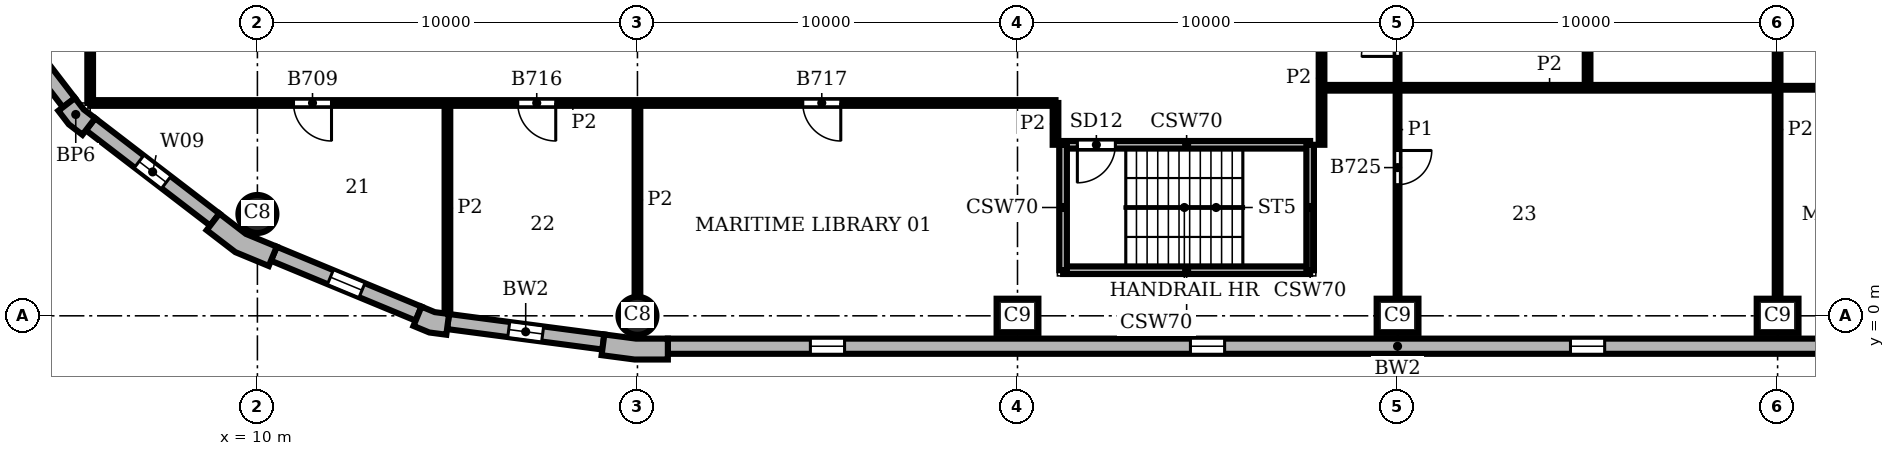
"""IFC4 building model, lengths in metres.
Left out: names, types, materials, properties, quantities, classifications, styles, units other than length and angle.
Written with IfcOpenShell. Run it as: python <this file> out.ifc"""

import sys

from ifc_helpers import new_model, si_unit, direction, frame, frame_2d, origin, origin_2d, place, context, subcontext, project, spatial, polyline, rectangle, circle, outline, extrude, element, fill, save


model = new_model("IFC4")
c1 = context("Model", 3, precision=1e-05, world=origin(), true_north=direction((0.0, 1.0)))
c2 = subcontext(c1, "Body", "Model", "MODEL_VIEW")
j1 = project(units=[si_unit("LENGTHUNIT", "METRE"), si_unit("PLANEANGLEUNIT", "RADIAN")], contexts=[c1])
p1 = place(None, origin())
s1 = spatial("IfcSite", under=j1, at=p1, CompositionType="ELEMENT")
p2 = place(p1, origin())
s2 = spatial("IfcBuilding", under=s1, at=p2, CompositionType="ELEMENT")
p3 = place(p2, frame((0.0, 0.0, 205.8)))
s3 = spatial("IfcBuildingStorey", under=s2, at=p3, CompositionType="ELEMENT", Elevation=205.8)
p4 = place(p3, frame((20.0, 0.0, 0.0), z_axis=(0.0, 0.0, 1.0), x_axis=(1.0, 0.0, 0.0)))
e1 = element("IfcColumn", 1, at=p4, inside=s3, PredefinedType="COLUMN", context=c2, shape_type="SweptSolid", body=[
    extrude(circle(Radius=0.5, at=origin_2d()), origin(), (0.0, 0.0, 1.0), 3.9),
])
for number, where, z_axis, x_axis in (
    (2, (30.0, 0.0, 0.0), (0.0, 0.0, 1.0), (1.0, 0.0, 0.0)),
    (3, (40.0, 0.0, 0.0), (0.0, 0.0, 1.0), (1.0, 0.0, 0.0)),
    (4, (50.0, 0.0, 0.0), (0.0, 0.0, 1.0), (1.0, 0.0, 0.0)),
):
    element("IfcColumn", number, at=place(p3, frame(where, z_axis=z_axis, x_axis=x_axis)), inside=s3, PredefinedType="COLUMN", context=c2, shape_type="SweptSolid", body=[
        extrude(rectangle(XDim=1.1, YDim=0.9, at=origin_2d()), origin(), (0.0, 0.0, 1.0), 3.9),
    ])
p5 = place(p3, frame((10.0, 2.679, 0.0), z_axis=(0.0, 0.0, 1.0), x_axis=(1.0, 0.0, 0.0)))
e5 = element("IfcColumn", 5, at=p5, inside=s3, PredefinedType="COLUMN", context=c2, shape_type="SweptSolid", body=[
    extrude(circle(Radius=0.5, at=origin_2d()), origin(), (0.0, 0.0, 1.0), 3.9),
])
p6 = place(p3, origin())
e6 = element("IfcWall", 6, at=p6, inside=s3, PredefinedType="SOLIDWALL", context=c2, shape_type="SweptSolid", body=[
    extrude(outline(polyline([(19.076, -0.887), (19.057, -1.036), (19.925, -1.15), (20.8, -1.15), (20.8, -1.0), (20.8, -0.6), (19.961, -0.6), (19.128, -0.49), (19.076, -0.887)])), origin(), (0.0, 0.0, 1.0), 3.9),
])
e7 = element("IfcWall", 7, at=p6, inside=s3, PredefinedType="SOLIDWALL", context=c2, shape_type="SweptSolid", body=[
    extrude(outline(polyline([(4.882, 5.487), (4.763, 5.396), (5.038, 5.038), (5.396, 4.763), (5.487, 4.882), (5.731, 5.199), (5.43, 5.43), (5.199, 5.731), (4.882, 5.487)])), origin(), (0.0, 0.0, 1.0), 3.9),
])
e8 = element("IfcWall", 8, at=p6, inside=s3, PredefinedType="SOLIDWALL", context=c2, shape_type="SweptSolid", body=[
    extrude(outline(polyline([(8.757, 2.373), (8.665, 2.254), (9.42, 1.675), (10.299, 1.311), (10.356, 1.449), (10.51, 1.819), (9.698, 2.155), (9.0, 2.69), (8.757, 2.373)])), origin(), (0.0, 0.0, 1.0), 3.9),
])
e9 = element("IfcWall", 9, at=p6, inside=s3, PredefinedType="SOLIDWALL", context=c2, shape_type="SweptSolid", body=[
    extrude(outline(polyline([(14.164, -0.128), (14.106, -0.266), (14.523, -0.439), (14.971, -0.498), (14.99, -0.349), (15.043, 0.047), (14.667, 0.097), (14.317, 0.242), (14.164, -0.128)])), origin(), (0.0, 0.0, 1.0), 3.9),
])
p7 = place(p3, frame((20.8, -0.8, 0.0), z_axis=(0.0, 0.0, 1.0), x_axis=(1.0, 0.0, 0.0)))
e10 = element("IfcWall", 10, at=p7, inside=s3, PredefinedType="SOLIDWALL", context=c2, shape_type="SweptSolid", body=[
    extrude(rectangle(XDim=38.4, YDim=0.4, at=frame_2d((19.2, 0.0))), origin(), (0.0, 0.0, 1.0), 3.9),
])
p8 = place(p7, frame((3.75, 0.0, 0.9)))
e11 = element("IfcOpeningElement", 11, at=p8, cuts=e10, PredefinedType="OPENING", context=c2, shape_type="SweptSolid", body=[
    extrude(rectangle(XDim=0.9, YDim=2.35, at=frame_2d((0.45, 1.175))), frame((0.0, 0.21, 0.0), z_axis=(0.0, -1.0, 0.0), x_axis=(1.0, 0.0, 0.0)), (0.0, 0.0, 1.0), 0.42),
])
p9 = place(p7, frame((13.75, 0.0, 0.9)))
e12 = element("IfcOpeningElement", 12, at=p9, cuts=e10, PredefinedType="OPENING", context=c2, shape_type="SweptSolid", body=[
    extrude(rectangle(XDim=0.9, YDim=2.35, at=frame_2d((0.45, 1.175))), frame((0.0, 0.21, 0.0), z_axis=(0.0, -1.0, 0.0), x_axis=(1.0, 0.0, 0.0)), (0.0, 0.0, 1.0), 0.42),
])
p10 = place(p7, frame((23.75, 0.0, 0.9)))
e13 = element("IfcOpeningElement", 13, at=p10, cuts=e10, PredefinedType="OPENING", context=c2, shape_type="SweptSolid", body=[
    extrude(rectangle(XDim=0.9, YDim=2.35, at=frame_2d((0.45, 1.175))), frame((0.0, 0.21, 0.0), z_axis=(0.0, -1.0, 0.0), x_axis=(1.0, 0.0, 0.0)), (0.0, 0.0, 1.0), 0.42),
])
p11 = place(p7, frame((33.75, 0.0, 0.9)))
e14 = element("IfcOpeningElement", 14, at=p11, cuts=e10, PredefinedType="OPENING", context=c2, shape_type="SweptSolid", body=[
    extrude(rectangle(XDim=0.9, YDim=2.35, at=frame_2d((0.45, 1.175))), frame((0.0, 0.21, 0.0), z_axis=(0.0, -1.0, 0.0), x_axis=(1.0, 0.0, 0.0)), (0.0, 0.0, 1.0), 0.42),
])
p12 = place(p3, frame((2.532, 8.878, 0.0), z_axis=(0.0, 0.0, 1.0), x_axis=(0.608759824817, -0.793354571229, 0.0)))
e15 = element("IfcWall", 15, at=p12, inside=s3, PredefinedType="SOLIDWALL", context=c2, shape_type="SweptSolid", body=[
    extrude(rectangle(XDim=4.121, YDim=0.4, at=frame_2d((2.061, 0.0))), origin(), (0.0, 0.0, 1.0), 3.9),
])
p13 = place(p12, frame((1.611, 0.0, 0.9)))
e16 = element("IfcOpeningElement", 16, at=p13, cuts=e15, PredefinedType="OPENING", context=c2, shape_type="SweptSolid", body=[
    extrude(rectangle(XDim=0.9, YDim=2.35, at=frame_2d((0.45, 1.175))), frame((0.0, 0.21, 0.0), z_axis=(0.0, -1.0, 0.0), x_axis=(1.0, 0.0, 0.0)), (0.0, 0.0, 1.0), 0.42),
])
p14 = place(p3, frame((5.609, 5.041, 0.0), z_axis=(0.0, 0.0, 1.0), x_axis=(0.793354571229, -0.608759824817, 0.0)))
e17 = element("IfcWall", 17, at=p14, inside=s3, PredefinedType="SOLIDWALL", context=c2, shape_type="SweptSolid", body=[
    extrude(rectangle(XDim=4.121, YDim=0.4, at=frame_2d((2.061, 0.0))), origin(), (0.0, 0.0, 1.0), 3.9),
])
p15 = place(p14, frame((1.611, 0.0, 0.9)))
e18 = element("IfcOpeningElement", 18, at=p15, cuts=e17, PredefinedType="OPENING", context=c2, shape_type="SweptSolid", body=[
    extrude(rectangle(XDim=0.9, YDim=2.35, at=frame_2d((0.45, 1.175))), frame((0.0, 0.21, 0.0), z_axis=(0.0, -1.0, 0.0), x_axis=(1.0, 0.0, 0.0)), (0.0, 0.0, 1.0), 0.42),
])
p16 = place(p3, frame((10.433, 1.634, 0.0), z_axis=(0.0, 0.0, 1.0), x_axis=(0.923863744394, -0.382721546029, 0.0)))
e19 = element("IfcWall", 19, at=p16, inside=s3, PredefinedType="SOLIDWALL", context=c2, shape_type="SweptSolid", body=[
    extrude(rectangle(XDim=4.121, YDim=0.4, at=frame_2d((2.061, 0.0))), origin(), (0.0, 0.0, 1.0), 3.9),
])
p17 = place(p16, frame((1.611, 0.0, 0.9)))
e20 = element("IfcOpeningElement", 20, at=p17, cuts=e19, PredefinedType="OPENING", context=c2, shape_type="SweptSolid", body=[
    extrude(rectangle(XDim=0.9, YDim=2.35, at=frame_2d((0.45, 1.175))), frame((0.0, 0.21, 0.0), z_axis=(0.0, -1.0, 0.0), x_axis=(1.0, 0.0, 0.0)), (0.0, 0.0, 1.0), 0.42),
])
p18 = place(p3, frame((15.017, -0.151, 0.0), z_axis=(0.0, 0.0, 1.0), x_axis=(0.991446429508, -0.130514280502, 0.0)))
e21 = element("IfcWall", 21, at=p18, inside=s3, PredefinedType="SOLIDWALL", context=c2, shape_type="SweptSolid", body=[
    extrude(rectangle(XDim=4.121, YDim=0.4, at=frame_2d((2.061, 0.0))), origin(), (0.0, 0.0, 1.0), 3.9),
])
p19 = place(p18, frame((1.611, 0.0, 0.9)))
e22 = element("IfcOpeningElement", 22, at=p19, cuts=e21, PredefinedType="OPENING", context=c2, shape_type="SweptSolid", body=[
    extrude(rectangle(XDim=0.9, YDim=2.35, at=frame_2d((0.45, 1.175))), frame((0.0, 0.21, 0.0), z_axis=(0.0, -1.0, 0.0), x_axis=(1.0, 0.0, 0.0)), (0.0, 0.0, 1.0), 0.42),
])
p20 = place(p3, frame((31.2, 1.2, 0.0), z_axis=(0.0, 0.0, 1.0), x_axis=(1.0, 0.0, 0.0)))
e23 = element("IfcWall", 23, at=p20, inside=s3, PredefinedType="SHEAR", context=c2, shape_type="SweptSolid", body=[
    extrude(rectangle(XDim=6.5, YDim=0.2, at=frame_2d((3.25, 0.0))), origin(), (0.0, 0.0, 1.0), 3.58),
])
p21 = place(p3, frame((31.2, 4.5, 0.0), z_axis=(0.0, 0.0, 1.0), x_axis=(1.0, 0.0, 0.0)))
e24 = element("IfcWall", 24, at=p21, inside=s3, PredefinedType="SHEAR", context=c2, shape_type="SweptSolid", body=[
    extrude(rectangle(XDim=6.5, YDim=0.2, at=frame_2d((3.25, 0.0))), origin(), (0.0, 0.0, 1.0), 3.58),
])
p22 = place(p21, frame((0.375, 0.0, 0.0)))
e25 = element("IfcOpeningElement", 25, at=p22, cuts=e24, PredefinedType="OPENING", context=c2, shape_type="SweptSolid", body=[
    extrude(rectangle(XDim=1.0, YDim=2.1, at=frame_2d((0.5, 1.05))), frame((0.0, 0.11, 0.0), z_axis=(0.0, -1.0, 0.0), x_axis=(1.0, 0.0, 0.0)), (0.0, 0.0, 1.0), 0.22),
])
for number, where, z_axis, x_axis in (
    (26, (31.2, 1.2, 0.0), (0.0, 0.0, 1.0), (0.0, 1.0, 0.0)),
    (27, (37.7, 1.2, 0.0), (0.0, 0.0, 1.0), (0.0, 1.0, 0.0)),
):
    element("IfcWall", number, at=place(p3, frame(where, z_axis=z_axis, x_axis=x_axis)), inside=s3, PredefinedType="SHEAR", context=c2, shape_type="SweptSolid", body=[
        extrude(rectangle(XDim=3.3, YDim=0.2, at=frame_2d((1.65, 0.0))), origin(), (0.0, 0.0, 1.0), 3.58),
    ])
p23 = place(p3, frame((40.0, 0.45, 0.0), z_axis=(0.0, 0.0, 1.0), x_axis=(0.0, 1.0, 0.0)))
e28 = element("IfcWall", 28, at=p23, inside=s3, PredefinedType="PARTITIONING", context=c2, shape_type="SweptSolid", body=[
    extrude(rectangle(XDim=8.9, YDim=0.1, at=frame_2d((4.45, 0.0))), origin(), (0.0, 0.0, 1.0), 3.58),
])
p24 = place(p23, frame((6.375, 0.0, 0.0)))
e29 = element("IfcOpeningElement", 29, at=p24, cuts=e28, PredefinedType="OPENING", context=c2, shape_type="SweptSolid", body=[
    extrude(rectangle(XDim=0.95, YDim=2.1, at=frame_2d((0.475, 1.05))), frame((0.0, 0.06, 0.0), z_axis=(0.0, -1.0, 0.0), x_axis=(1.0, 0.0, 0.0)), (0.0, 0.0, 1.0), 0.12),
])
p25 = place(p23, frame((3.0, 0.0, 0.0)))
e30 = element("IfcOpeningElement", 30, at=p25, cuts=e28, PredefinedType="OPENING", context=c2, shape_type="SweptSolid", body=[
    extrude(rectangle(XDim=0.9, YDim=2.1, at=frame_2d((0.45, 1.05))), frame((0.0, 0.06, 0.0), z_axis=(0.0, -1.0, 0.0), x_axis=(1.0, 0.0, 0.0)), (0.0, 0.0, 1.0), 0.12),
])
p26 = place(p3, frame((50.0, 6.0, 0.0), z_axis=(0.0, 0.0, 1.0), x_axis=(1.0, 0.0, 0.0)))
e31 = element("IfcWall", 31, at=p26, inside=s3, PredefinedType="PARTITIONING", context=c2, shape_type="SweptSolid", body=[
    extrude(rectangle(XDim=5.0, YDim=0.1, at=frame_2d((2.5, 0.0))), origin(), (0.0, 0.0, 1.0), 3.58),
])
p27 = place(p3, frame((5.6, 5.6, 0.0), z_axis=(0.0, 0.0, 1.0), x_axis=(0.0, 1.0, 0.0)))
e32 = element("IfcWall", 32, at=p27, inside=s3, PredefinedType="PARTITIONING", context=c2, shape_type="SweptSolid", body=[
    extrude(rectangle(XDim=22.4, YDim=0.15, at=frame_2d((11.2, 0.0))), origin(), (0.0, 0.0, 1.0), 3.58),
])
p28 = place(p27, frame((5.35, 0.0, 0.0)))
e33 = element("IfcOpeningElement", 33, at=p28, cuts=e32, PredefinedType="OPENING", context=c2, shape_type="SweptSolid", body=[
    extrude(rectangle(XDim=1.0, YDim=2.1, at=frame_2d((0.5, 1.05))), frame((0.0, 0.085, 0.0), z_axis=(0.0, -1.0, 0.0), x_axis=(1.0, 0.0, 0.0)), (0.0, 0.0, 1.0), 0.17),
])
p29 = place(p27, frame((11.5, 0.0, 0.0)))
e34 = element("IfcOpeningElement", 34, at=p29, cuts=e32, PredefinedType="OPENING", context=c2, shape_type="SweptSolid", body=[
    extrude(rectangle(XDim=1.0, YDim=2.1, at=frame_2d((0.5, 1.05))), frame((0.0, 0.085, 0.0), z_axis=(0.0, -1.0, 0.0), x_axis=(1.0, 0.0, 0.0)), (0.0, 0.0, 1.0), 0.17),
])
p30 = place(p27, frame((18.25, 0.0, 0.0)))
e35 = element("IfcOpeningElement", 35, at=p30, cuts=e32, PredefinedType="OPENING", context=c2, shape_type="SweptSolid", body=[
    extrude(rectangle(XDim=1.8, YDim=2.1, at=frame_2d((0.9, 1.05))), frame((0.0, 0.085, 0.0), z_axis=(0.0, -1.0, 0.0), x_axis=(1.0, 0.0, 0.0)), (0.0, 0.0, 1.0), 0.17),
])
p31 = place(p3, frame((15.0, 0.063, 0.0), z_axis=(0.0, 0.0, 1.0), x_axis=(0.0, 1.0, 0.0)))
e36 = element("IfcWall", 36, at=p31, inside=s3, PredefinedType="PARTITIONING", context=c2, shape_type="SweptSolid", body=[
    extrude(rectangle(XDim=5.537, YDim=0.15, at=frame_2d((2.769, 0.0))), origin(), (0.0, 0.0, 1.0), 3.58),
])
p32 = place(p3, frame((20.0, 0.5, 0.0), z_axis=(0.0, 0.0, 1.0), x_axis=(0.0, 1.0, 0.0)))
e37 = element("IfcWall", 37, at=p32, inside=s3, PredefinedType="PARTITIONING", context=c2, shape_type="SweptSolid", body=[
    extrude(rectangle(XDim=5.1, YDim=0.15, at=frame_2d((2.55, 0.0))), origin(), (0.0, 0.0, 1.0), 3.58),
])
p33 = place(p3, frame((31.0, 4.5, 0.0), z_axis=(0.0, 0.0, 1.0), x_axis=(0.0, 1.0, 0.0)))
e38 = element("IfcWall", 38, at=p33, inside=s3, PredefinedType="PARTITIONING", context=c2, shape_type="SweptSolid", body=[
    extrude(rectangle(XDim=1.1, YDim=0.15, at=frame_2d((0.55, 0.0))), origin(), (0.0, 0.0, 1.0), 3.58),
])
p34 = place(p3, frame((38.0, 4.5, 0.0), z_axis=(0.0, 0.0, 1.0), x_axis=(0.0, 1.0, 0.0)))
e39 = element("IfcWall", 39, at=p34, inside=s3, PredefinedType="PARTITIONING", context=c2, shape_type="SweptSolid", body=[
    extrude(rectangle(XDim=3.5, YDim=0.15, at=frame_2d((1.75, 0.0))), origin(), (0.0, 0.0, 1.0), 3.58),
])
p35 = place(p3, frame((45.0, 6.0, 0.0), z_axis=(0.0, 0.0, 1.0), x_axis=(0.0, 1.0, 0.0)))
e40 = element("IfcWall", 40, at=p35, inside=s3, PredefinedType="PARTITIONING", context=c2, shape_type="SweptSolid", body=[
    extrude(rectangle(XDim=7.5, YDim=0.15, at=frame_2d((3.75, 0.0))), origin(), (0.0, 0.0, 1.0), 3.58),
])
p36 = place(p3, frame((50.0, 0.45, 0.0), z_axis=(0.0, 0.0, 1.0), x_axis=(0.0, 1.0, 0.0)))
e41 = element("IfcWall", 41, at=p36, inside=s3, PredefinedType="PARTITIONING", context=c2, shape_type="SweptSolid", body=[
    extrude(rectangle(XDim=8.9, YDim=0.15, at=frame_2d((4.45, 0.0))), origin(), (0.0, 0.0, 1.0), 3.58),
])
p37 = place(p3, frame((5.6, 5.6, 0.0), z_axis=(0.0, 0.0, 1.0), x_axis=(1.0, 0.0, 0.0)))
e42 = element("IfcWall", 42, at=p37, inside=s3, PredefinedType="PARTITIONING", context=c2, shape_type="SweptSolid", body=[
    extrude(rectangle(XDim=25.4, YDim=0.15, at=frame_2d((12.7, 0.0))), origin(), (0.0, 0.0, 1.0), 3.58),
])
p38 = place(p37, frame((5.35, 0.0, 0.0)))
e43 = element("IfcOpeningElement", 43, at=p38, cuts=e42, PredefinedType="OPENING", context=c2, shape_type="SweptSolid", body=[
    extrude(rectangle(XDim=1.0, YDim=2.1, at=frame_2d((0.5, 1.05))), frame((0.0, 0.085, 0.0), z_axis=(0.0, -1.0, 0.0), x_axis=(1.0, 0.0, 0.0)), (0.0, 0.0, 1.0), 0.17),
])
p39 = place(p37, frame((11.25, 0.0, 0.0)))
e44 = element("IfcOpeningElement", 44, at=p39, cuts=e42, PredefinedType="OPENING", context=c2, shape_type="SweptSolid", body=[
    extrude(rectangle(XDim=1.0, YDim=2.1, at=frame_2d((0.5, 1.05))), frame((0.0, 0.085, 0.0), z_axis=(0.0, -1.0, 0.0), x_axis=(1.0, 0.0, 0.0)), (0.0, 0.0, 1.0), 0.17),
])
p40 = place(p37, frame((18.75, 0.0, 0.0)))
e45 = element("IfcOpeningElement", 45, at=p40, cuts=e42, PredefinedType="OPENING", context=c2, shape_type="SweptSolid", body=[
    extrude(rectangle(XDim=1.0, YDim=2.1, at=frame_2d((0.5, 1.05))), frame((0.0, 0.085, 0.0), z_axis=(0.0, -1.0, 0.0), x_axis=(1.0, 0.0, 0.0)), (0.0, 0.0, 1.0), 0.17),
])
p41 = place(p3, frame((38.0, 6.0, 0.0), z_axis=(0.0, 0.0, 1.0), x_axis=(1.0, 0.0, 0.0)))
e46 = element("IfcWall", 46, at=p41, inside=s3, PredefinedType="PARTITIONING", context=c2, shape_type="SweptSolid", body=[
    extrude(rectangle(XDim=12.0, YDim=0.15, at=frame_2d((6.0, 0.0))), origin(), (0.0, 0.0, 1.0), 3.58),
])
p42 = place(p8, origin())
e47 = element("IfcWindow", 47, at=p42, inside=s3, PartitioningType="SINGLE_PANEL", PredefinedType="WINDOW", context=c2, shape_type="SweptSolid", body=[
    extrude(rectangle(XDim=0.9, YDim=2.35, at=frame_2d((0.45, 1.175))), frame((0.0, 0.16, 0.0), z_axis=(0.0, -1.0, 0.0), x_axis=(1.0, 0.0, 0.0)), (0.0, 0.0, 1.0), 0.06),
])
fill(e11, e47)
p43 = place(p9, origin())
e48 = element("IfcWindow", 48, at=p43, inside=s3, PartitioningType="SINGLE_PANEL", PredefinedType="WINDOW", context=c2, shape_type="SweptSolid", body=[
    extrude(rectangle(XDim=0.9, YDim=2.35, at=frame_2d((0.45, 1.175))), frame((0.0, 0.16, 0.0), z_axis=(0.0, -1.0, 0.0), x_axis=(1.0, 0.0, 0.0)), (0.0, 0.0, 1.0), 0.06),
])
fill(e12, e48)
p44 = place(p10, origin())
e49 = element("IfcWindow", 49, at=p44, inside=s3, PartitioningType="SINGLE_PANEL", PredefinedType="WINDOW", context=c2, shape_type="SweptSolid", body=[
    extrude(rectangle(XDim=0.9, YDim=2.35, at=frame_2d((0.45, 1.175))), frame((0.0, 0.16, 0.0), z_axis=(0.0, -1.0, 0.0), x_axis=(1.0, 0.0, 0.0)), (0.0, 0.0, 1.0), 0.06),
])
fill(e13, e49)
p45 = place(p15, origin())
e50 = element("IfcWindow", 50, at=p45, inside=s3, PartitioningType="SINGLE_PANEL", PredefinedType="WINDOW", context=c2, shape_type="SweptSolid", body=[
    extrude(rectangle(XDim=0.9, YDim=2.35, at=frame_2d((0.45, 1.175))), frame((0.0, 0.16, 0.0), z_axis=(0.0, -1.0, 0.0), x_axis=(1.0, 0.0, 0.0)), (0.0, 0.0, 1.0), 0.06),
])
fill(e18, e50)
p46 = place(p17, origin())
e51 = element("IfcWindow", 51, at=p46, inside=s3, PartitioningType="SINGLE_PANEL", PredefinedType="WINDOW", context=c2, shape_type="SweptSolid", body=[
    extrude(rectangle(XDim=0.9, YDim=2.35, at=frame_2d((0.45, 1.175))), frame((0.0, 0.16, 0.0), z_axis=(0.0, -1.0, 0.0), x_axis=(1.0, 0.0, 0.0)), (0.0, 0.0, 1.0), 0.06),
])
fill(e20, e51)
p47 = place(p19, origin())
e52 = element("IfcWindow", 52, at=p47, inside=s3, PartitioningType="SINGLE_PANEL", PredefinedType="WINDOW", context=c2, shape_type="SweptSolid", body=[
    extrude(rectangle(XDim=0.9, YDim=2.35, at=frame_2d((0.45, 1.175))), frame((0.0, 0.16, 0.0), z_axis=(0.0, -1.0, 0.0), x_axis=(1.0, 0.0, 0.0)), (0.0, 0.0, 1.0), 0.06),
])
fill(e22, e52)
p48 = place(p22, frame((1.0, 0.0, 0.0), z_axis=(0.0, 0.0, 1.0), x_axis=(-1.0, 0.0, 0.0)))
e53 = element("IfcDoor", 53, at=p48, inside=s3, OperationType="SINGLE_SWING_RIGHT", PredefinedType="DOOR", context=c2, shape_type="SweptSolid", body=[
    extrude(rectangle(XDim=1.0, YDim=2.1, at=frame_2d((0.5, 1.05))), frame((0.0, 0.025, 0.0), z_axis=(0.0, -1.0, 0.0), x_axis=(1.0, 0.0, 0.0)), (0.0, 0.0, 1.0), 0.05),
])
fill(e25, e53)
p49 = place(p38, frame((1.0, 0.0, 0.0), z_axis=(0.0, 0.0, 1.0), x_axis=(-1.0, 0.0, 0.0)))
e54 = element("IfcDoor", 54, at=p49, inside=s3, OperationType="SINGLE_SWING_LEFT", PredefinedType="DOOR", context=c2, shape_type="SweptSolid", body=[
    extrude(rectangle(XDim=1.0, YDim=2.1, at=frame_2d((0.5, 1.05))), frame((0.0, 0.025, 0.0), z_axis=(0.0, -1.0, 0.0), x_axis=(1.0, 0.0, 0.0)), (0.0, 0.0, 1.0), 0.05),
])
fill(e43, e54)
p50 = place(p39, frame((1.0, 0.0, 0.0), z_axis=(0.0, 0.0, 1.0), x_axis=(-1.0, 0.0, 0.0)))
e55 = element("IfcDoor", 55, at=p50, inside=s3, OperationType="SINGLE_SWING_LEFT", PredefinedType="DOOR", context=c2, shape_type="SweptSolid", body=[
    extrude(rectangle(XDim=1.0, YDim=2.1, at=frame_2d((0.5, 1.05))), frame((0.0, 0.025, 0.0), z_axis=(0.0, -1.0, 0.0), x_axis=(1.0, 0.0, 0.0)), (0.0, 0.0, 1.0), 0.05),
])
fill(e44, e55)
p51 = place(p40, frame((1.0, 0.0, 0.0), z_axis=(0.0, 0.0, 1.0), x_axis=(-1.0, 0.0, 0.0)))
e56 = element("IfcDoor", 56, at=p51, inside=s3, OperationType="SINGLE_SWING_LEFT", PredefinedType="DOOR", context=c2, shape_type="SweptSolid", body=[
    extrude(rectangle(XDim=1.0, YDim=2.1, at=frame_2d((0.5, 1.05))), frame((0.0, 0.025, 0.0), z_axis=(0.0, -1.0, 0.0), x_axis=(1.0, 0.0, 0.0)), (0.0, 0.0, 1.0), 0.05),
])
fill(e45, e56)
p52 = place(p24, origin())
e57 = element("IfcDoor", 57, at=p52, inside=s3, OperationType="SINGLE_SWING_LEFT", PredefinedType="DOOR", context=c2, shape_type="SweptSolid", body=[
    extrude(rectangle(XDim=0.95, YDim=2.1, at=frame_2d((0.475, 1.05))), frame((0.0, 0.025, 0.0), z_axis=(0.0, -1.0, 0.0), x_axis=(1.0, 0.0, 0.0)), (0.0, 0.0, 1.0), 0.05),
])
fill(e29, e57)
p53 = place(p25, frame((0.9, 0.0, 0.0), z_axis=(0.0, 0.0, 1.0), x_axis=(-1.0, 0.0, 0.0)))
e58 = element("IfcDoor", 58, at=p53, inside=s3, OperationType="SINGLE_SWING_LEFT", PredefinedType="DOOR", context=c2, shape_type="SweptSolid", body=[
    extrude(rectangle(XDim=0.9, YDim=2.1, at=frame_2d((0.45, 1.05))), frame((0.0, 0.025, 0.0), z_axis=(0.0, -1.0, 0.0), x_axis=(1.0, 0.0, 0.0)), (0.0, 0.0, 1.0), 0.05),
])
fill(e30, e58)
save(model, sys.argv[1])
